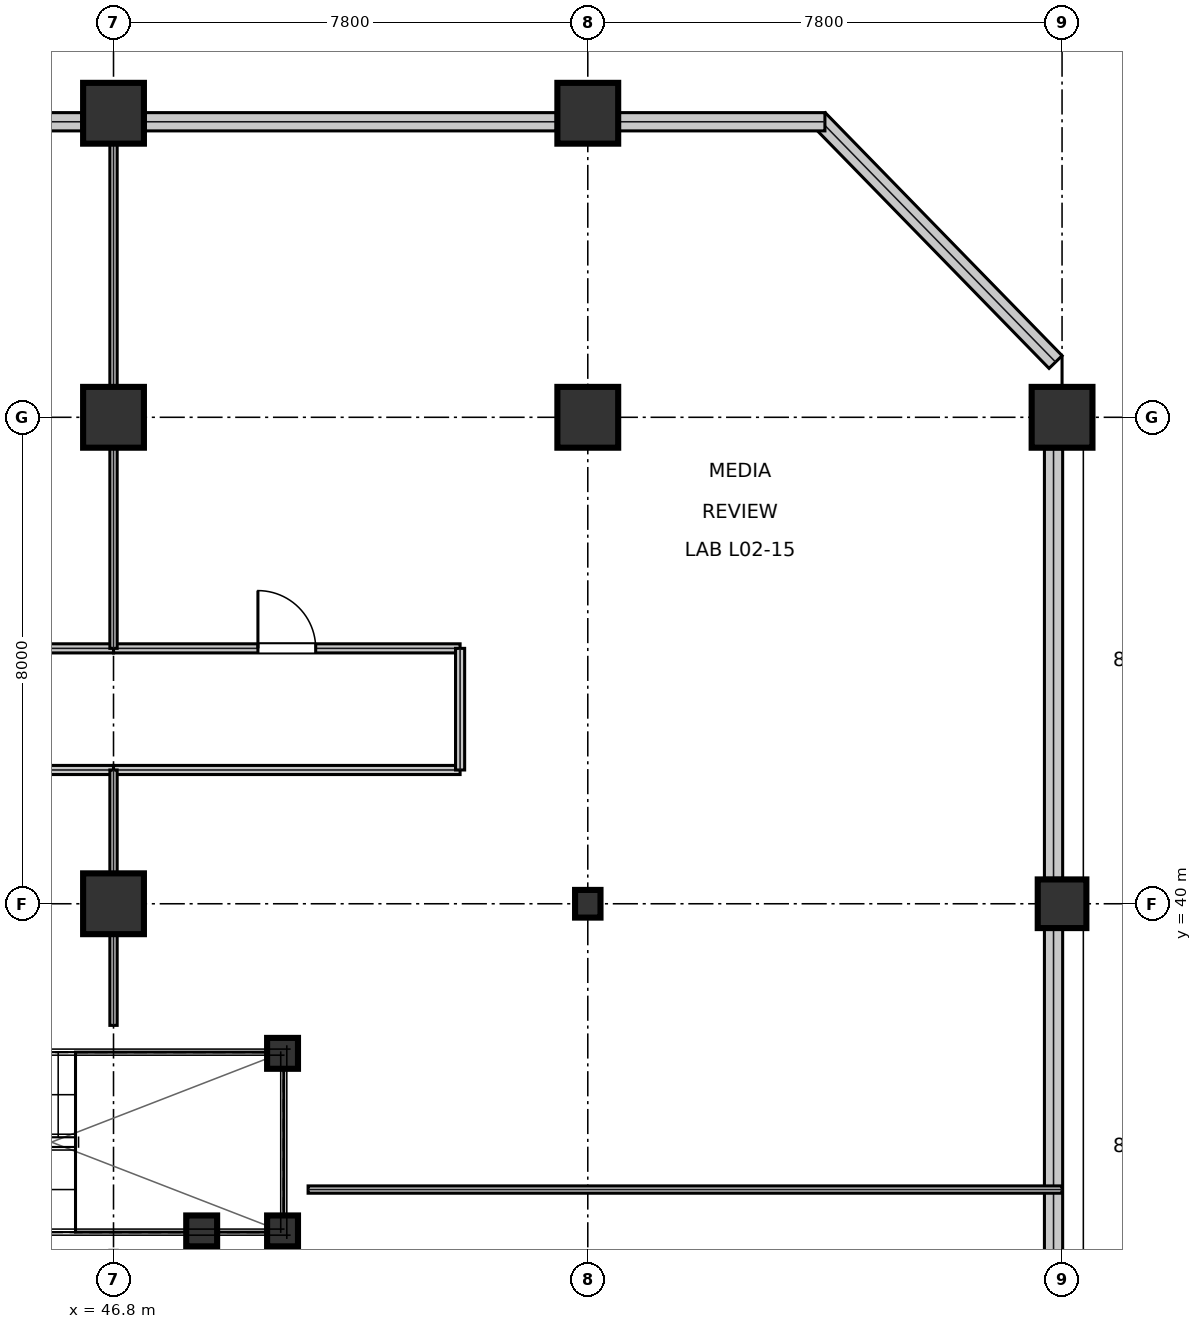
"""IFC4 building model, lengths in metres.
Left out: names, types, materials, properties, quantities, classifications, styles, units other than length and angle.
Written with IfcOpenShell. Run it as: python <this file> out.ifc"""

import sys

from ifc_helpers import new_model, si_unit, direction, frame, frame_2d, origin, origin_2d, place, context, subcontext, project, spatial, rectangle, hollow_circle, i_section, extrude, element, fill, save


model = new_model("IFC4")
c1 = context("Model", 3, precision=1e-05, world=origin(), true_north=direction((0.0, 1.0)))
c2 = subcontext(c1, "Body", "Model", "MODEL_VIEW")
j1 = project(units=[si_unit("LENGTHUNIT", "METRE"), si_unit("PLANEANGLEUNIT", "RADIAN")], contexts=[c1])
p1 = place(None, origin())
s1 = spatial("IfcSite", under=j1, at=p1, CompositionType="ELEMENT")
p2 = place(p1, origin())
s2 = spatial("IfcBuilding", under=s1, at=p2, CompositionType="ELEMENT")
p3 = place(p2, frame((0.0, 0.0, 10.8)))
s3 = spatial("IfcBuildingStorey", under=s2, at=p3, CompositionType="ELEMENT", Elevation=10.8)
for number, where, z_axis, x_axis in (
    (1, (46.8, 40.0, 0.0), (0.0, 0.0, 1.0), (1.0, 0.0, 0.0)),
    (2, (46.8, 48.0, 0.0), (0.0, 0.0, 1.0), (1.0, 0.0, 0.0)),
    (3, (46.8, 53.0, 0.0), (0.0, 0.0, 1.0), (1.0, 0.0, 0.0)),
):
    element("IfcColumn", number, at=place(p3, frame(where, z_axis=z_axis, x_axis=x_axis)), inside=s3, PredefinedType="COLUMN", context=c2, shape_type="SweptSolid", body=[
        extrude(rectangle(XDim=1.0, YDim=1.0, at=origin_2d()), origin(), (0.0, 0.0, 1.0), 5.395),
    ])
p4 = place(p3, frame((54.6, 40.0, 0.0), z_axis=(0.0, 0.0, 1.0), x_axis=(1.0, 0.0, 0.0)))
e4 = element("IfcColumn", 4, at=p4, inside=s3, PredefinedType="COLUMN", context=c2, shape_type="SweptSolid", body=[
    extrude(i_section(OverallWidth=0.418, OverallDepth=0.455, WebThickness=0.042, FlangeThickness=0.068, at=origin_2d()), origin(), (0.0, 0.0, 1.0), 5.395),
])
for number, where, z_axis, x_axis in (
    (5, (54.6, 48.0, 0.0), (0.0, 0.0, 1.0), (1.0, 0.0, 0.0)),
    (6, (54.6, 53.0, 0.0), (0.0, 0.0, 1.0), (1.0, 0.0, 0.0)),
):
    element("IfcColumn", number, at=place(p3, frame(where, z_axis=z_axis, x_axis=x_axis)), inside=s3, PredefinedType="COLUMN", context=c2, shape_type="SweptSolid", body=[
        extrude(rectangle(XDim=1.0, YDim=1.0, at=origin_2d()), origin(), (0.0, 0.0, 1.0), 5.395),
    ])
p5 = place(p3, frame((62.4, 40.0, 0.0), z_axis=(0.0, 0.0, 1.0), x_axis=(1.0, 0.0, 0.0)))
e7 = element("IfcColumn", 7, at=p5, inside=s3, PredefinedType="COLUMN", context=c2, shape_type="SweptSolid", body=[
    extrude(rectangle(XDim=0.8, YDim=0.8, at=origin_2d()), origin(), (0.0, 0.0, 1.0), 5.395),
])
p6 = place(p3, frame((62.4, 48.0, 0.0), z_axis=(0.0, 0.0, 1.0), x_axis=(1.0, 0.0, 0.0)))
e8 = element("IfcColumn", 8, at=p6, inside=s3, PredefinedType="COLUMN", context=c2, shape_type="SweptSolid", body=[
    extrude(rectangle(XDim=1.0, YDim=1.0, at=origin_2d()), origin(), (0.0, 0.0, 1.0), 5.395),
])
for number, where, z_axis, x_axis in (
    (9, (48.25, 34.62, 0.0), (0.0, 0.0, 1.0), (1.0, 0.0, 0.0)),
    (10, (49.58, 34.62, 0.0), (0.0, 0.0, 1.0), (1.0, 0.0, 0.0)),
    (11, (49.58, 37.54, 0.0), (0.0, 0.0, 1.0), (1.0, 0.0, 0.0)),
):
    element("IfcColumn", number, at=place(p3, frame(where, z_axis=z_axis, x_axis=x_axis)), inside=s3, PredefinedType="COLUMN", context=c2, shape_type="SweptSolid", body=[
        extrude(hollow_circle(Radius=0.254, WallThickness=0.02, at=origin_2d()), origin(), (0.0, 0.0, 1.0), 5.394),
    ])
for number, where, z_axis, x_axis in (
    (12, (62.26, 32.518, 0.0), (0.0, 0.0, 1.0), (0.0, 1.0, 0.0)),
    (13, (62.26, 40.418, 0.0), (0.0, 0.0, 1.0), (0.0, 1.0, 0.0)),
):
    element("IfcWall", number, at=place(p3, frame(where, z_axis=z_axis, x_axis=x_axis)), inside=s3, PredefinedType="STANDARD", context=c2, shape_type="SweptSolid", body=[
        extrude(rectangle(XDim=7.064, YDim=0.3, at=frame_2d((3.532, 0.0))), origin(), (0.0, 0.0, 1.0), 4.648),
    ])
p7 = place(p3, frame((62.293, 48.909, 0.0), z_axis=(0.0, 0.0, 1.0), x_axis=(-0.698076573741, 0.716023112193, 0.0)))
e14 = element("IfcWall", 14, at=p7, inside=s3, PredefinedType="STANDARD", context=c2, shape_type="SweptSolid", body=[
    extrude(rectangle(XDim=5.578, YDim=0.3, at=frame_2d((2.789, 0.0))), origin(), (0.0, 0.0, 1.0), 5.12),
])
p8 = place(p3, frame((58.5, 52.86, 0.0), z_axis=(0.0, 0.0, 1.0), x_axis=(-1.0, 0.0, 0.0)))
e15 = element("IfcWall", 15, at=p8, inside=s3, PredefinedType="STANDARD", context=c2, shape_type="SweptSolid", body=[
    extrude(rectangle(XDim=3.382, YDim=0.3, at=frame_2d((1.691, 0.0))), origin(), (0.0, 0.0, 1.0), 5.12),
])
for number, where, z_axis, x_axis in (
    (16, (54.082, 52.86, 0.0), (0.0, 0.0, 1.0), (-1.0, 0.0, 0.0)),
    (17, (46.282, 52.86, 0.0), (0.0, 0.0, 1.0), (-1.0, 0.0, 0.0)),
):
    element("IfcWall", number, at=place(p3, frame(where, z_axis=z_axis, x_axis=x_axis)), inside=s3, PredefinedType="STANDARD", context=c2, shape_type="SweptSolid", body=[
        extrude(rectangle(XDim=6.764, YDim=0.3, at=frame_2d((3.382, 0.0))), origin(), (0.0, 0.0, 1.0), 4.648),
    ])
p9 = place(p3, frame((35.8, 42.2, 0.0), z_axis=(0.0, 0.0, 1.0), x_axis=(1.0, 0.0, 0.0)))
e18 = element("IfcWall", 18, at=p9, inside=s3, PredefinedType="PARTITIONING", context=c2, shape_type="SweptSolid", body=[
    extrude(rectangle(XDim=11.0, YDim=0.15, at=frame_2d((5.5, 0.0))), origin(), (0.0, 0.0, 1.0), 4.415),
])
p10 = place(p9, frame((5.025, 0.0, 0.0)))
e19 = element("IfcOpeningElement", 19, at=p10, cuts=e18, PredefinedType="OPENING", context=c2, shape_type="SweptSolid", body=[
    extrude(rectangle(XDim=0.95, YDim=2.15, at=frame_2d((0.475, 1.075))), frame((0.0, 0.085, 0.0), z_axis=(0.0, -1.0, 0.0), x_axis=(1.0, 0.0, 0.0)), (0.0, 0.0, 1.0), 0.17),
])
p11 = place(p3, frame((46.8, 44.2, 0.0), z_axis=(0.0, 0.0, 1.0), x_axis=(1.0, 0.0, 0.0)))
e20 = element("IfcWall", 20, at=p11, inside=s3, PredefinedType="PARTITIONING", context=c2, shape_type="SweptSolid", body=[
    extrude(rectangle(XDim=5.7, YDim=0.15, at=frame_2d((2.85, 0.0))), origin(), (0.0, 0.0, 1.0), 4.415),
])
p12 = place(p11, frame((2.375, 0.0, 0.0)))
e21 = element("IfcOpeningElement", 21, at=p12, cuts=e20, PredefinedType="OPENING", context=c2, shape_type="SweptSolid", body=[
    extrude(rectangle(XDim=0.95, YDim=2.15, at=frame_2d((0.475, 1.075))), frame((0.0, 0.085, 0.0), z_axis=(0.0, -1.0, 0.0), x_axis=(1.0, 0.0, 0.0)), (0.0, 0.0, 1.0), 0.17),
])
p13 = place(p3, frame((35.8, 44.2, 0.0), z_axis=(0.0, 0.0, 1.0), x_axis=(1.0, 0.0, 0.0)))
e22 = element("IfcWall", 22, at=p13, inside=s3, PredefinedType="PARTITIONING", context=c2, shape_type="SweptSolid", body=[
    extrude(rectangle(XDim=11.0, YDim=0.15, at=frame_2d((5.5, 0.0))), origin(), (0.0, 0.0, 1.0), 4.415),
])
p14 = place(p13, frame((5.025, 0.0, 0.0)))
e23 = element("IfcOpeningElement", 23, at=p14, cuts=e22, PredefinedType="OPENING", context=c2, shape_type="SweptSolid", body=[
    extrude(rectangle(XDim=0.95, YDim=2.15, at=frame_2d((0.475, 1.075))), frame((0.0, 0.085, 0.0), z_axis=(0.0, -1.0, 0.0), x_axis=(1.0, 0.0, 0.0)), (0.0, 0.0, 1.0), 0.17),
])
p15 = place(p3, frame((46.8, 42.2, 0.0), z_axis=(0.0, 0.0, 1.0), x_axis=(1.0, 0.0, 0.0)))
e24 = element("IfcWall", 24, at=p15, inside=s3, PredefinedType="PARTITIONING", context=c2, shape_type="SweptSolid", body=[
    extrude(rectangle(XDim=5.7, YDim=0.15, at=frame_2d((2.85, 0.0))), origin(), (0.0, 0.0, 1.0), 4.415),
])
p16 = place(p3, frame((52.5, 42.2, 0.0), z_axis=(0.0, 0.0, 1.0), x_axis=(0.0, 1.0, 0.0)))
e25 = element("IfcWall", 25, at=p16, inside=s3, PredefinedType="PARTITIONING", context=c2, shape_type="SweptSolid", body=[
    extrude(rectangle(XDim=2.0, YDim=0.15, at=frame_2d((1.0, 0.0))), origin(), (0.0, 0.0, 1.0), 4.701),
])
p17 = place(p3, frame((50.0, 35.3, 0.0), z_axis=(0.0, 0.0, 1.0), x_axis=(1.0, 0.0, 0.0)))
e26 = element("IfcWall", 26, at=p17, inside=s3, PredefinedType="PARTITIONING", context=c2, shape_type="SweptSolid", body=[
    extrude(rectangle(XDim=12.4, YDim=0.12, at=frame_2d((6.2, 0.0))), origin(), (0.0, 0.0, 1.0), 4.415),
])
p18 = place(p3, frame((46.8, 38.0, 0.0), z_axis=(0.0, 0.0, 1.0), x_axis=(0.0, 1.0, 0.0)))
e27 = element("IfcWall", 27, at=p18, inside=s3, PredefinedType="PARTITIONING", context=c2, shape_type="SweptSolid", body=[
    extrude(rectangle(XDim=4.2, YDim=0.12, at=frame_2d((2.1, 0.0))), origin(), (0.0, 0.0, 1.0), 4.338),
])
p19 = place(p3, frame((46.8, 44.2, 0.0), z_axis=(0.0, 0.0, 1.0), x_axis=(0.0, 1.0, 0.0)))
e28 = element("IfcWall", 28, at=p19, inside=s3, PredefinedType="PARTITIONING", context=c2, shape_type="SweptSolid", body=[
    extrude(rectangle(XDim=8.8, YDim=0.12, at=frame_2d((4.4, 0.0))), origin(), (0.0, 0.0, 1.0), 4.338),
])
p20 = place(p12, origin())
e29 = element("IfcDoor", 29, at=p20, inside=s3, OperationType="SINGLE_SWING_LEFT", PredefinedType="DOOR", context=c2, shape_type="SweptSolid", body=[
    extrude(rectangle(XDim=0.95, YDim=2.15, at=frame_2d((0.475, 1.075))), frame((0.0, 0.025, 0.0), z_axis=(0.0, -1.0, 0.0), x_axis=(1.0, 0.0, 0.0)), (0.0, 0.0, 1.0), 0.05),
])
fill(e21, e29)
save(model, sys.argv[1])
